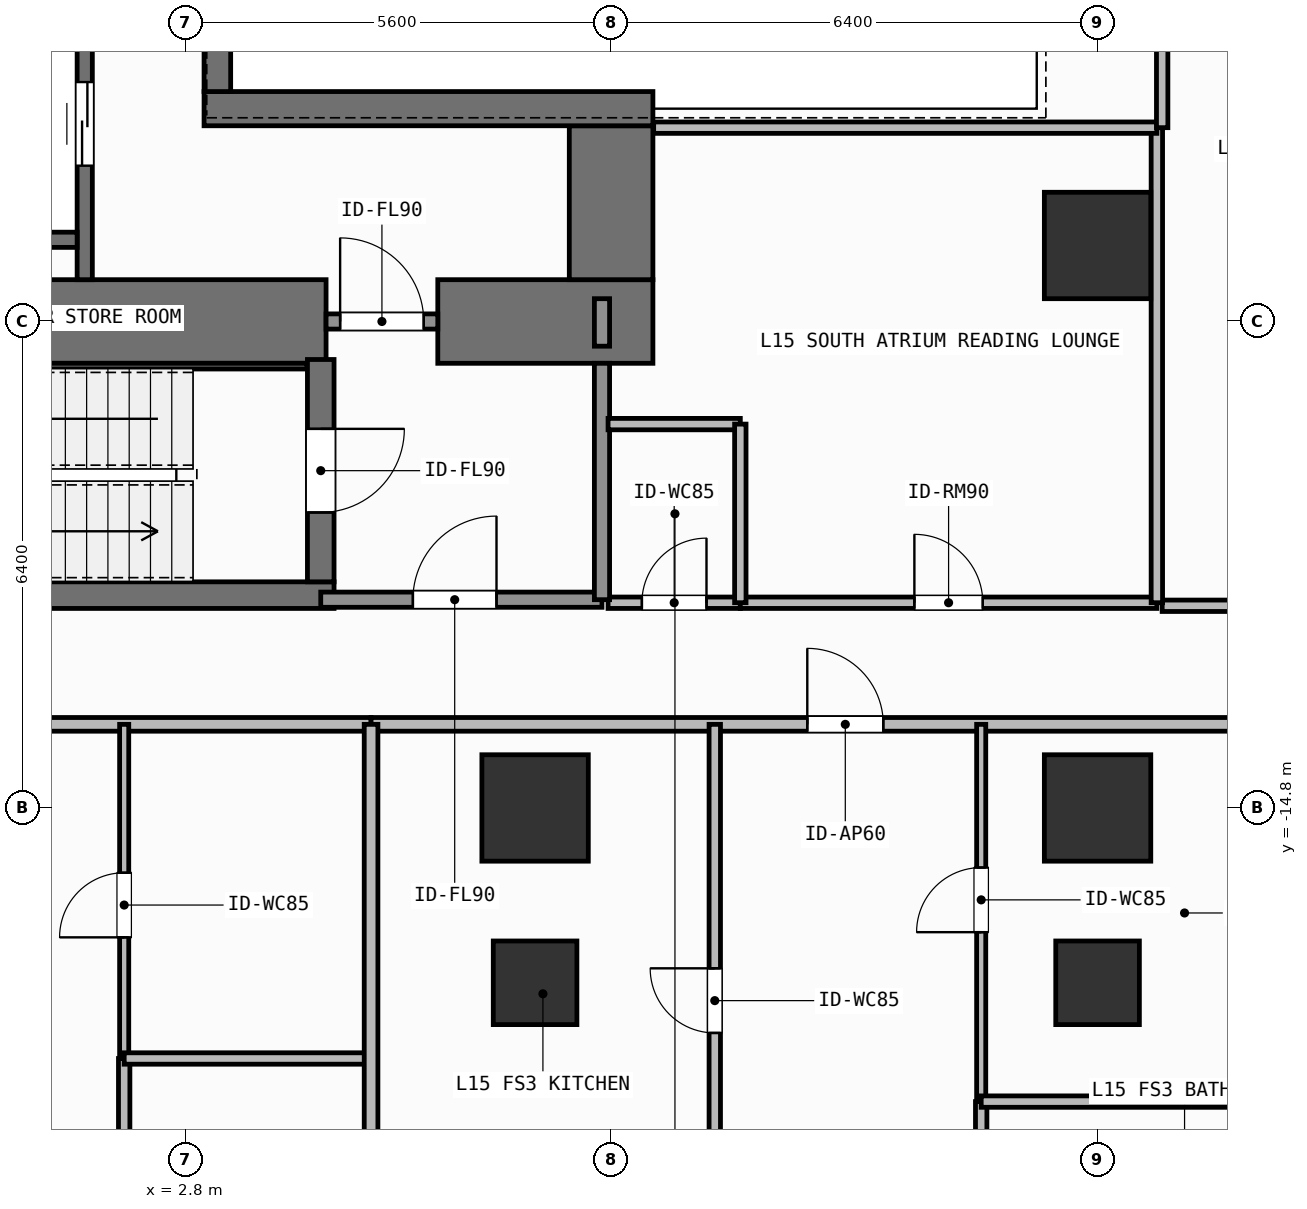
"""IFC4 building model, lengths in metres.
Left out: names, types, materials, properties, quantities, classifications, styles, units other than length and angle.
Written with IfcOpenShell. Run it as: python <this file> out.ifc"""

import sys

from ifc_helpers import new_model, si_unit, direction, frame, frame_2d, origin, origin_2d, place, context, subcontext, project, spatial, rectangle, extrude, element, fill, save


model = new_model("IFC4")
c1 = context("Model", 3, precision=1e-05, world=origin(), true_north=direction((0.0, 1.0)))
c2 = subcontext(c1, "Body", "Model", "MODEL_VIEW")
j1 = project(units=[si_unit("LENGTHUNIT", "METRE"), si_unit("PLANEANGLEUNIT", "RADIAN")], contexts=[c1])
p1 = place(None, origin())
s1 = spatial("IfcSite", under=j1, at=p1, CompositionType="ELEMENT")
p2 = place(p1, origin())
s2 = spatial("IfcBuilding", under=s1, at=p2, CompositionType="ELEMENT")
p3 = place(p2, frame((0.0, 0.0, 57.9)))
s3 = spatial("IfcBuildingStorey", under=s2, at=p3, CompositionType="ELEMENT", Elevation=57.9)
p4 = place(p3, frame((-2.62, -8.4, 0.0), z_axis=(0.0, 0.0, 1.0), x_axis=(1.0, 0.0, 0.0)))
e1 = element("IfcWall", 1, at=p4, inside=s3, PredefinedType="SHEAR", context=c2, shape_type="SweptSolid", body=[
    extrude(rectangle(XDim=7.27, YDim=1.1, at=frame_2d((3.635, 0.0))), origin(), (0.0, 0.0, 1.0), 3.9),
])
p5 = place(p3, frame((6.12, -8.4, 0.0), z_axis=(0.0, 0.0, 1.0), x_axis=(1.0, 0.0, 0.0)))
e2 = element("IfcWall", 2, at=p5, inside=s3, PredefinedType="SHEAR", context=c2, shape_type="SweptSolid", body=[
    extrude(rectangle(XDim=2.83, YDim=1.1, at=frame_2d((1.415, 0.0))), origin(), (0.0, 0.0, 1.0), 3.9),
])
p6 = place(p3, frame((8.4, -7.85, 0.0), z_axis=(0.0, 0.0, 1.0), x_axis=(0.0, 1.0, 0.0)))
e3 = element("IfcWall", 3, at=p6, inside=s3, PredefinedType="SHEAR", context=c2, shape_type="SweptSolid", body=[
    extrude(rectangle(XDim=2.025, YDim=1.1, at=frame_2d((1.013, 0.0))), origin(), (0.0, 0.0, 1.0), 3.9),
])
p7 = place(p3, frame((3.045, -5.6, 0.0), z_axis=(0.0, 0.0, 1.0), x_axis=(1.0, 0.0, 0.0)))
e4 = element("IfcWall", 4, at=p7, inside=s3, PredefinedType="SHEAR", context=c2, shape_type="SweptSolid", body=[
    extrude(rectangle(XDim=5.905, YDim=0.45, at=frame_2d((2.953, 0.0))), origin(), (0.0, 0.0, 1.0), 3.9),
])
p8 = place(p3, frame((3.22, -5.375, 0.0), z_axis=(0.0, 0.0, 1.0), x_axis=(0.0, 1.0, 0.0)))
e5 = element("IfcWall", 5, at=p8, inside=s3, PredefinedType="SHEAR", context=c2, shape_type="SweptSolid", body=[
    extrude(rectangle(XDim=10.75, YDim=0.35, at=frame_2d((5.375, 0.0))), origin(), (0.0, 0.0, 1.0), 3.9),
])
p9 = place(p3, frame((-2.555, -12.0, 0.0), z_axis=(0.0, 0.0, 1.0), x_axis=(1.0, 0.0, 0.0)))
e6 = element("IfcWall", 6, at=p9, inside=s3, PredefinedType="SHEAR", context=c2, shape_type="SweptSolid", body=[
    extrude(rectangle(XDim=7.31, YDim=0.35, at=frame_2d((3.655, 0.0))), origin(), (0.0, 0.0, 1.0), 3.9),
])
p10 = place(p3, frame((-2.2, -8.988, 0.0), z_axis=(0.0, 0.0, 1.0), x_axis=(1.0, 0.0, 0.0)))
e7 = element("IfcWall", 7, at=p10, inside=s3, PredefinedType="SHEAR", context=c2, shape_type="SweptSolid", body=[
    extrude(rectangle(XDim=6.6, YDim=0.075, at=frame_2d((3.3, 0.0))), origin(), (0.0, 0.0, 1.0), 3.9),
])
p11 = place(p3, frame((4.58, -8.9, 0.0), z_axis=(0.0, 0.0, 1.0), x_axis=(0.0, -1.0, 0.0)))
e8 = element("IfcWall", 8, at=p11, inside=s3, PredefinedType="SHEAR", context=c2, shape_type="SweptSolid", body=[
    extrude(rectangle(XDim=2.925, YDim=0.35, at=frame_2d((1.462, 0.0))), origin(), (0.0, 0.0, 1.0), 3.9),
])
p12 = place(p11, frame((0.913, 0.0, 0.0)))
e9 = element("IfcOpeningElement", 9, at=p12, cuts=e8, PredefinedType="OPENING", context=c2, shape_type="SweptSolid", body=[
    extrude(rectangle(XDim=1.1, YDim=2.15, at=frame_2d((0.55, 1.075))), frame((0.0, 0.185, 0.0), z_axis=(0.0, -1.0, 0.0), x_axis=(1.0, 0.0, 0.0)), (0.0, 0.0, 1.0), 0.37),
])
for number, where, z_axis, x_axis in (
    (10, (7.4, -14.8, 0.0), (0.0, 0.0, 1.0), (1.0, 0.0, 0.0)),
    (11, (14.8, -14.8, 0.0), (0.0, 0.0, 1.0), (1.0, 0.0, 0.0)),
    (12, (14.8, -7.4, 0.0), (0.0, 0.0, 1.0), (1.0, 0.0, 0.0)),
):
    element("IfcColumn", number, at=place(p3, frame(where, z_axis=z_axis, x_axis=x_axis)), inside=s3, PredefinedType="COLUMN", context=c2, shape_type="SweptSolid", body=[
        extrude(rectangle(XDim=1.4, YDim=1.4, at=origin_2d()), origin(), (0.0, 0.0, 1.0), 3.9),
    ])
for number, where, z_axis, x_axis in (
    (13, (7.4, -17.1, 0.0), (0.0, 0.0, 1.0), (1.0, 0.0, 0.0)),
    (14, (14.8, -17.1, 0.0), (0.0, 0.0, 1.0), (1.0, 0.0, 0.0)),
):
    element("IfcColumn", number, at=place(p3, frame(where, z_axis=z_axis, x_axis=x_axis)), inside=s3, PredefinedType="COLUMN", context=c2, shape_type="SweptSolid", body=[
        extrude(rectangle(XDim=1.1, YDim=1.1, at=origin_2d()), origin(), (0.0, 0.0, 1.0), 3.9),
    ])
p13 = place(p3, frame((1.475, -7.85, 0.0), z_axis=(0.0, 0.0, 1.0), x_axis=(0.0, 1.0, 0.0)))
e15 = element("IfcWall", 15, at=p13, inside=s3, PredefinedType="SHEAR", context=c2, shape_type="SweptSolid", body=[
    extrude(rectangle(XDim=3.575, YDim=0.2, at=frame_2d((1.788, 0.0))), origin(), (0.0, 0.0, 1.0), 3.68),
])
p14 = place(p13, frame((1.5, 0.0, 0.0)))
e16 = element("IfcOpeningElement", 16, at=p14, cuts=e15, PredefinedType="OPENING", context=c2, shape_type="SweptSolid", body=[
    extrude(rectangle(XDim=1.1, YDim=2.2, at=frame_2d((0.55, 1.1))), frame((0.0, 0.11, 0.0), z_axis=(0.0, -1.0, 0.0), x_axis=(1.0, 0.0, 0.0)), (0.0, 0.0, 1.0), 0.22),
])
p15 = place(p3, frame((-0.975, -7.325, 0.0), z_axis=(0.0, 0.0, 1.0), x_axis=(1.0, 0.0, 0.0)))
e17 = element("IfcWall", 17, at=p15, inside=s3, PredefinedType="SHEAR", context=c2, shape_type="SweptSolid", body=[
    extrude(rectangle(XDim=2.35, YDim=0.2, at=frame_2d((1.175, 0.0))), origin(), (0.0, 0.0, 1.0), 3.68),
])
p16 = place(p3, frame((4.58, -12.06, 0.0), z_axis=(0.0, 0.0, 1.0), x_axis=(1.0, 0.0, 0.0)))
e18 = element("IfcWall", 18, at=p16, inside=s3, PredefinedType="SOLIDWALL", context=c2, shape_type="SweptSolid", body=[
    extrude(rectangle(XDim=3.7, YDim=0.2, at=frame_2d((1.85, 0.0))), origin(), (0.0, 0.0, 1.0), 3.68),
])
p17 = place(p16, frame((1.212, 0.0, 0.0)))
e19 = element("IfcOpeningElement", 19, at=p17, cuts=e18, PredefinedType="OPENING", context=c2, shape_type="SweptSolid", body=[
    extrude(rectangle(XDim=1.1, YDim=2.15, at=frame_2d((0.55, 1.075))), frame((0.0, 0.11, 0.0), z_axis=(0.0, -1.0, 0.0), x_axis=(1.0, 0.0, 0.0)), (0.0, 0.0, 1.0), 0.22),
])
p18 = place(p3, frame((4.65, -8.4, 0.0), z_axis=(0.0, 0.0, 1.0), x_axis=(1.0, 0.0, 0.0)))
e20 = element("IfcWall", 20, at=p18, inside=s3, PredefinedType="SOLIDWALL", context=c2, shape_type="SweptSolid", body=[
    extrude(rectangle(XDim=1.47, YDim=0.2, at=frame_2d((0.735, 0.0))), origin(), (0.0, 0.0, 1.0), 2.72),
])
p19 = place(p18, frame((0.185, 0.0, 0.0)))
e21 = element("IfcOpeningElement", 21, at=p19, cuts=e20, PredefinedType="OPENING", context=c2, shape_type="SweptSolid", body=[
    extrude(rectangle(XDim=1.1, YDim=2.15, at=frame_2d((0.55, 1.075))), frame((0.0, 0.11, 0.0), z_axis=(0.0, -1.0, 0.0), x_axis=(1.0, 0.0, 0.0)), (0.0, 0.0, 1.0), 0.22),
])
p20 = place(p3, frame((8.36, -12.1, 0.0), z_axis=(0.0, 0.0, 1.0), x_axis=(1.0, 0.0, 0.0)))
e22 = element("IfcWall", 22, at=p20, inside=s3, PredefinedType="PARTITIONING", context=c2, shape_type="SweptSolid", body=[
    extrude(rectangle(XDim=1.74, YDim=0.15, at=frame_2d((0.87, 0.0))), origin(), (0.0, 0.0, 1.0), 3.68),
])
p21 = place(p20, frame((0.445, 0.0, 0.0)))
e23 = element("IfcOpeningElement", 23, at=p21, cuts=e22, PredefinedType="OPENING", context=c2, shape_type="SweptSolid", body=[
    extrude(rectangle(XDim=0.85, YDim=2.1, at=frame_2d((0.425, 1.05))), frame((0.0, 0.085, 0.0), z_axis=(0.0, -1.0, 0.0), x_axis=(1.0, 0.0, 0.0)), (0.0, 0.0, 1.0), 0.17),
])
p22 = place(p3, frame((10.1, -12.1, 0.0), z_axis=(0.0, 0.0, 1.0), x_axis=(1.0, 0.0, 0.0)))
e24 = element("IfcWall", 24, at=p22, inside=s3, PredefinedType="PARTITIONING", context=c2, shape_type="SweptSolid", body=[
    extrude(rectangle(XDim=5.48, YDim=0.15, at=frame_2d((2.74, 0.0))), origin(), (0.0, 0.0, 1.0), 3.68),
])
p23 = place(p22, frame((2.29, 0.0, 0.0)))
e25 = element("IfcOpeningElement", 25, at=p23, cuts=e24, PredefinedType="OPENING", context=c2, shape_type="SweptSolid", body=[
    extrude(rectangle(XDim=0.9, YDim=2.1, at=frame_2d((0.45, 1.05))), frame((0.0, 0.085, 0.0), z_axis=(0.0, -1.0, 0.0), x_axis=(1.0, 0.0, 0.0)), (0.0, 0.0, 1.0), 0.17),
])
p24 = place(p3, frame((-12.225, -13.7, 0.0), z_axis=(0.0, 0.0, 1.0), x_axis=(1.0, 0.0, 0.0)))
e26 = element("IfcWall", 26, at=p24, inside=s3, PredefinedType="PARTITIONING", context=c2, shape_type="SweptSolid", body=[
    extrude(rectangle(XDim=17.467, YDim=0.18, at=frame_2d((8.733, 0.0))), origin(), (0.0, 0.0, 1.0), 3.68),
])
p25 = place(p24, frame((9.848, 0.0, 0.0)))
e27 = element("IfcOpeningElement", 27, at=p25, cuts=e26, PredefinedType="OPENING", context=c2, shape_type="SweptSolid", body=[
    extrude(rectangle(XDim=1.0, YDim=2.2, at=frame_2d((0.5, 1.1))), frame((0.0, 0.1, 0.0), z_axis=(0.0, -1.0, 0.0), x_axis=(1.0, 0.0, 0.0)), (0.0, 0.0, 1.0), 0.2),
])
p26 = place(p3, frame((1.994, -20.79, 0.0), z_axis=(0.0, 0.0, 1.0), x_axis=(0.0, 1.0, 0.0)))
e28 = element("IfcWall", 28, at=p26, inside=s3, PredefinedType="PARTITIONING", context=c2, shape_type="SweptSolid", body=[
    extrude(rectangle(XDim=2.694, YDim=0.15, at=frame_2d((1.347, 0.0))), origin(), (0.0, 0.0, 1.0), 3.68),
])
p27 = place(p26, frame((0.837, 0.0, 0.0)))
e29 = element("IfcOpeningElement", 29, at=p27, cuts=e28, PredefinedType="OPENING", context=c2, shape_type="SweptSolid", body=[
    extrude(rectangle(XDim=0.85, YDim=2.1, at=frame_2d((0.425, 1.05))), frame((0.0, 0.085, 0.0), z_axis=(0.0, -1.0, 0.0), x_axis=(1.0, 0.0, 0.0)), (0.0, 0.0, 1.0), 0.17),
])
p28 = place(p3, frame((1.994, -18.096, 0.0), z_axis=(0.0, 0.0, 1.0), x_axis=(0.0, 1.0, 0.0)))
e30 = element("IfcWall", 30, at=p28, inside=s3, PredefinedType="PARTITIONING", context=c2, shape_type="SweptSolid", body=[
    extrude(rectangle(XDim=4.396, YDim=0.12, at=frame_2d((2.198, 0.0))), origin(), (0.0, 0.0, 1.0), 3.68),
])
p29 = place(p28, frame((1.594, 0.0, 0.0)))
e31 = element("IfcOpeningElement", 31, at=p29, cuts=e30, PredefinedType="OPENING", context=c2, shape_type="SweptSolid", body=[
    extrude(rectangle(XDim=0.85, YDim=2.1, at=frame_2d((0.425, 1.05))), frame((0.0, 0.07, 0.0), z_axis=(0.0, -1.0, 0.0), x_axis=(1.0, 0.0, 0.0)), (0.0, 0.0, 1.0), 0.14),
])
p30 = place(p3, frame((5.242, -13.7, 0.0), z_axis=(0.0, 0.0, 1.0), x_axis=(1.0, 0.0, 0.0)))
e32 = element("IfcWall", 32, at=p30, inside=s3, PredefinedType="PARTITIONING", context=c2, shape_type="SweptSolid", body=[
    extrude(rectangle(XDim=13.378, YDim=0.18, at=frame_2d((6.689, 0.0))), origin(), (0.0, 0.0, 1.0), 3.68),
])
p31 = place(p30, frame((5.739, 0.0, 0.0)))
e33 = element("IfcOpeningElement", 33, at=p31, cuts=e32, PredefinedType="OPENING", context=c2, shape_type="SweptSolid", body=[
    extrude(rectangle(XDim=1.0, YDim=2.2, at=frame_2d((0.5, 1.1))), frame((0.0, 0.1, 0.0), z_axis=(0.0, -1.0, 0.0), x_axis=(1.0, 0.0, 0.0)), (0.0, 0.0, 1.0), 0.2),
])
p32 = place(p3, frame((9.764, -20.79, 0.0), z_axis=(0.0, 0.0, 1.0), x_axis=(0.0, 1.0, 0.0)))
e34 = element("IfcWall", 34, at=p32, inside=s3, PredefinedType="PARTITIONING", context=c2, shape_type="SweptSolid", body=[
    extrude(rectangle(XDim=7.09, YDim=0.15, at=frame_2d((3.545, 0.0))), origin(), (0.0, 0.0, 1.0), 3.68),
])
p33 = place(p32, frame((3.03, 0.0, 0.0)))
e35 = element("IfcOpeningElement", 35, at=p33, cuts=e34, PredefinedType="OPENING", context=c2, shape_type="SweptSolid", body=[
    extrude(rectangle(XDim=0.85, YDim=2.1, at=frame_2d((0.425, 1.05))), frame((0.0, 0.085, 0.0), z_axis=(0.0, -1.0, 0.0), x_axis=(1.0, 0.0, 0.0)), (0.0, 0.0, 1.0), 0.17),
])
p34 = place(p3, frame((13.269, -20.79, 0.0), z_axis=(0.0, 0.0, 1.0), x_axis=(0.0, 1.0, 0.0)))
e36 = element("IfcWall", 36, at=p34, inside=s3, PredefinedType="PARTITIONING", context=c2, shape_type="SweptSolid", body=[
    extrude(rectangle(XDim=2.127, YDim=0.15, at=frame_2d((1.063, 0.0))), origin(), (0.0, 0.0, 1.0), 3.68),
])
p35 = place(p34, frame((0.638, 0.0, 0.0)))
e37 = element("IfcOpeningElement", 37, at=p35, cuts=e36, PredefinedType="OPENING", context=c2, shape_type="SweptSolid", body=[
    extrude(rectangle(XDim=0.85, YDim=2.1, at=frame_2d((0.425, 1.05))), frame((0.0, 0.085, 0.0), z_axis=(0.0, -1.0, 0.0), x_axis=(1.0, 0.0, 0.0)), (0.0, 0.0, 1.0), 0.17),
])
p36 = place(p3, frame((13.269, -18.663, 0.0), z_axis=(0.0, 0.0, 1.0), x_axis=(0.0, 1.0, 0.0)))
e38 = element("IfcWall", 38, at=p36, inside=s3, PredefinedType="PARTITIONING", context=c2, shape_type="SweptSolid", body=[
    extrude(rectangle(XDim=4.963, YDim=0.12, at=frame_2d((2.481, 0.0))), origin(), (0.0, 0.0, 1.0), 3.68),
])
p37 = place(p36, frame((2.229, 0.0, 0.0)))
e39 = element("IfcOpeningElement", 39, at=p37, cuts=e38, PredefinedType="OPENING", context=c2, shape_type="SweptSolid", body=[
    extrude(rectangle(XDim=0.85, YDim=2.1, at=frame_2d((0.425, 1.05))), frame((0.0, 0.07, 0.0), z_axis=(0.0, -1.0, 0.0), x_axis=(1.0, 0.0, 0.0)), (0.0, 0.0, 1.0), 0.14),
])
p38 = place(p3, frame((15.65, -12.14, 0.0), z_axis=(0.0, 0.0, 1.0), x_axis=(1.0, 0.0, 0.0)))
e40 = element("IfcWall", 40, at=p38, inside=s3, PredefinedType="PARTITIONING", context=c2, shape_type="SweptSolid", body=[
    extrude(rectangle(XDim=6.47, YDim=0.15, at=frame_2d((3.235, 0.0))), origin(), (0.0, 0.0, 1.0), 3.68),
])
p39 = place(p38, frame((2.61, 0.0, 0.0)))
e41 = element("IfcOpeningElement", 41, at=p39, cuts=e40, PredefinedType="OPENING", context=c2, shape_type="SweptSolid", body=[
    extrude(rectangle(XDim=0.9, YDim=2.1, at=frame_2d((0.45, 1.05))), frame((0.0, 0.085, 0.0), z_axis=(0.0, -1.0, 0.0), x_axis=(1.0, 0.0, 0.0)), (0.0, 0.0, 1.0), 0.17),
])
p40 = place(p3, frame((8.28, -12.06, 0.0), z_axis=(0.0, 0.0, 1.0), x_axis=(0.0, 1.0, 0.0)))
e42 = element("IfcWall", 42, at=p40, inside=s3, PredefinedType="SOLIDWALL", context=c2, shape_type="SweptSolid", body=[
    extrude(rectangle(XDim=3.11, YDim=0.2, at=frame_2d((1.555, 0.0))), origin(), (0.0, 0.0, 1.0), 3.68),
])
p41 = place(p3, frame((8.28, -8.725, 0.0), z_axis=(0.0, 0.0, 1.0), x_axis=(0.0, 1.0, 0.0)))
e43 = element("IfcWall", 43, at=p41, inside=s3, PredefinedType="SOLIDWALL", context=c2, shape_type="SweptSolid", body=[
    extrude(rectangle(XDim=0.625, YDim=0.2, at=frame_2d((0.312, 0.0))), origin(), (0.0, 0.0, 1.0), 3.68),
])
p42 = place(p3, frame((8.36, -9.75, 0.0), z_axis=(0.0, 0.0, 1.0), x_axis=(1.0, 0.0, 0.0)))
e44 = element("IfcWall", 44, at=p42, inside=s3, PredefinedType="PARTITIONING", context=c2, shape_type="SweptSolid", body=[
    extrude(rectangle(XDim=1.74, YDim=0.15, at=frame_2d((0.87, 0.0))), origin(), (0.0, 0.0, 1.0), 3.68),
])
p43 = place(p3, frame((10.1, -12.1, 0.0), z_axis=(0.0, 0.0, 1.0), x_axis=(0.0, 1.0, 0.0)))
e45 = element("IfcWall", 45, at=p43, inside=s3, PredefinedType="PARTITIONING", context=c2, shape_type="SweptSolid", body=[
    extrude(rectangle(XDim=2.35, YDim=0.15, at=frame_2d((1.175, 0.0))), origin(), (0.0, 0.0, 1.0), 3.68),
])
p44 = place(p3, frame((15.58, -12.1, 0.0), z_axis=(0.0, 0.0, 1.0), x_axis=(0.0, 1.0, 0.0)))
e46 = element("IfcWall", 46, at=p44, inside=s3, PredefinedType="PARTITIONING", context=c2, shape_type="SweptSolid", body=[
    extrude(rectangle(XDim=6.25, YDim=0.15, at=frame_2d((3.125, 0.0))), origin(), (0.0, 0.0, 1.0), 3.68),
])
p45 = place(p3, frame((8.96, -5.85, 0.0), z_axis=(0.0, 0.0, 1.0), x_axis=(1.0, 0.0, 0.0)))
e47 = element("IfcWall", 47, at=p45, inside=s3, PredefinedType="PARTITIONING", context=c2, shape_type="SweptSolid", body=[
    extrude(rectangle(XDim=6.62, YDim=0.15, at=frame_2d((3.31, 0.0))), origin(), (0.0, 0.0, 1.0), 3.68),
])
p46 = place(p3, frame((1.994, -18.096, 0.0), z_axis=(0.0, 0.0, 1.0), x_axis=(1.0, 0.0, 0.0)))
e48 = element("IfcWall", 48, at=p46, inside=s3, PredefinedType="PARTITIONING", context=c2, shape_type="SweptSolid", body=[
    extrude(rectangle(XDim=3.248, YDim=0.15, at=frame_2d((1.624, 0.0))), origin(), (0.0, 0.0, 1.0), 3.68),
])
p47 = place(p3, frame((13.269, -18.663, 0.0), z_axis=(0.0, 0.0, 1.0), x_axis=(1.0, 0.0, 0.0)))
e49 = element("IfcWall", 49, at=p47, inside=s3, PredefinedType="PARTITIONING", context=c2, shape_type="SweptSolid", body=[
    extrude(rectangle(XDim=5.351, YDim=0.15, at=frame_2d((2.676, 0.0))), origin(), (0.0, 0.0, 1.0), 3.68),
])
p48 = place(p3, frame((5.242, -25.03, 0.0), z_axis=(0.0, 0.0, 1.0), x_axis=(0.0, 1.0, 0.0)))
e50 = element("IfcWall", 50, at=p48, inside=s3, PredefinedType="PARTITIONING", context=c2, shape_type="SweptSolid", body=[
    extrude(rectangle(XDim=11.33, YDim=0.18, at=frame_2d((5.665, 0.0))), origin(), (0.0, 0.0, 1.0), 3.68),
])
p49 = place(p3, frame((15.65, -5.85, 0.0), z_axis=(0.0, 0.0, 1.0), x_axis=(0.0, 1.0, 0.0)))
e51 = element("IfcWall", 51, at=p49, inside=s3, PredefinedType="PARTITIONING", context=c2, shape_type="SweptSolid", body=[
    extrude(rectangle(XDim=2.15, YDim=0.15, at=frame_2d((1.075, 0.0))), origin(), (0.0, 0.0, 1.0), 3.68),
])
p50 = place(p14, origin())
e52 = element("IfcDoor", 52, at=p50, inside=s3, OperationType="SLIDING_TO_LEFT", PredefinedType="DOOR", context=c2, shape_type="SweptSolid", body=[
    extrude(rectangle(XDim=1.1, YDim=2.2, at=frame_2d((0.55, 1.1))), frame((0.0, 0.025, 0.0), z_axis=(0.0, -1.0, 0.0), x_axis=(1.0, 0.0, 0.0)), (0.0, 0.0, 1.0), 0.05),
])
fill(e16, e52)
p51 = place(p12, origin())
e53 = element("IfcDoor", 53, at=p51, inside=s3, OperationType="SINGLE_SWING_LEFT", PredefinedType="DOOR", context=c2, shape_type="SweptSolid", body=[
    extrude(rectangle(XDim=1.1, YDim=2.15, at=frame_2d((0.55, 1.075))), frame((0.0, 0.025, 0.0), z_axis=(0.0, -1.0, 0.0), x_axis=(1.0, 0.0, 0.0)), (0.0, 0.0, 1.0), 0.05),
])
fill(e9, e53)
p52 = place(p17, origin())
e54 = element("IfcDoor", 54, at=p52, inside=s3, OperationType="SINGLE_SWING_RIGHT", PredefinedType="DOOR", context=c2, shape_type="SweptSolid", body=[
    extrude(rectangle(XDim=1.1, YDim=2.15, at=frame_2d((0.55, 1.075))), frame((0.0, 0.025, 0.0), z_axis=(0.0, -1.0, 0.0), x_axis=(1.0, 0.0, 0.0)), (0.0, 0.0, 1.0), 0.05),
])
fill(e19, e54)
p53 = place(p19, origin())
e55 = element("IfcDoor", 55, at=p53, inside=s3, OperationType="SINGLE_SWING_LEFT", PredefinedType="DOOR", context=c2, shape_type="SweptSolid", body=[
    extrude(rectangle(XDim=1.1, YDim=2.15, at=frame_2d((0.55, 1.075))), frame((0.0, 0.025, 0.0), z_axis=(0.0, -1.0, 0.0), x_axis=(1.0, 0.0, 0.0)), (0.0, 0.0, 1.0), 0.05),
])
fill(e21, e55)
p54 = place(p21, origin())
e56 = element("IfcDoor", 56, at=p54, inside=s3, OperationType="SINGLE_SWING_RIGHT", PredefinedType="DOOR", context=c2, shape_type="SweptSolid", body=[
    extrude(rectangle(XDim=0.85, YDim=2.1, at=frame_2d((0.425, 1.05))), frame((0.0, 0.025, 0.0), z_axis=(0.0, -1.0, 0.0), x_axis=(1.0, 0.0, 0.0)), (0.0, 0.0, 1.0), 0.05),
])
fill(e23, e56)
p55 = place(p23, origin())
e57 = element("IfcDoor", 57, at=p55, inside=s3, OperationType="SINGLE_SWING_LEFT", PredefinedType="DOOR", context=c2, shape_type="SweptSolid", body=[
    extrude(rectangle(XDim=0.9, YDim=2.1, at=frame_2d((0.45, 1.05))), frame((0.0, 0.025, 0.0), z_axis=(0.0, -1.0, 0.0), x_axis=(1.0, 0.0, 0.0)), (0.0, 0.0, 1.0), 0.05),
])
fill(e25, e57)
p56 = place(p29, origin())
e58 = element("IfcDoor", 58, at=p56, inside=s3, OperationType="SINGLE_SWING_LEFT", PredefinedType="DOOR", context=c2, shape_type="SweptSolid", body=[
    extrude(rectangle(XDim=0.85, YDim=2.1, at=frame_2d((0.425, 1.05))), frame((0.0, 0.025, 0.0), z_axis=(0.0, -1.0, 0.0), x_axis=(1.0, 0.0, 0.0)), (0.0, 0.0, 1.0), 0.05),
])
fill(e31, e58)
p57 = place(p31, origin())
e59 = element("IfcDoor", 59, at=p57, inside=s3, OperationType="SINGLE_SWING_LEFT", PredefinedType="DOOR", context=c2, shape_type="SweptSolid", body=[
    extrude(rectangle(XDim=1.0, YDim=2.2, at=frame_2d((0.5, 1.1))), frame((0.0, 0.025, 0.0), z_axis=(0.0, -1.0, 0.0), x_axis=(1.0, 0.0, 0.0)), (0.0, 0.0, 1.0), 0.05),
])
fill(e33, e59)
p58 = place(p33, origin())
e60 = element("IfcDoor", 60, at=p58, inside=s3, OperationType="SINGLE_SWING_RIGHT", PredefinedType="DOOR", context=c2, shape_type="SweptSolid", body=[
    extrude(rectangle(XDim=0.85, YDim=2.1, at=frame_2d((0.425, 1.05))), frame((0.0, 0.025, 0.0), z_axis=(0.0, -1.0, 0.0), x_axis=(1.0, 0.0, 0.0)), (0.0, 0.0, 1.0), 0.05),
])
fill(e35, e60)
p59 = place(p37, origin())
e61 = element("IfcDoor", 61, at=p59, inside=s3, OperationType="SINGLE_SWING_LEFT", PredefinedType="DOOR", context=c2, shape_type="SweptSolid", body=[
    extrude(rectangle(XDim=0.85, YDim=2.1, at=frame_2d((0.425, 1.05))), frame((0.0, 0.025, 0.0), z_axis=(0.0, -1.0, 0.0), x_axis=(1.0, 0.0, 0.0)), (0.0, 0.0, 1.0), 0.05),
])
fill(e39, e61)
save(model, sys.argv[1])
